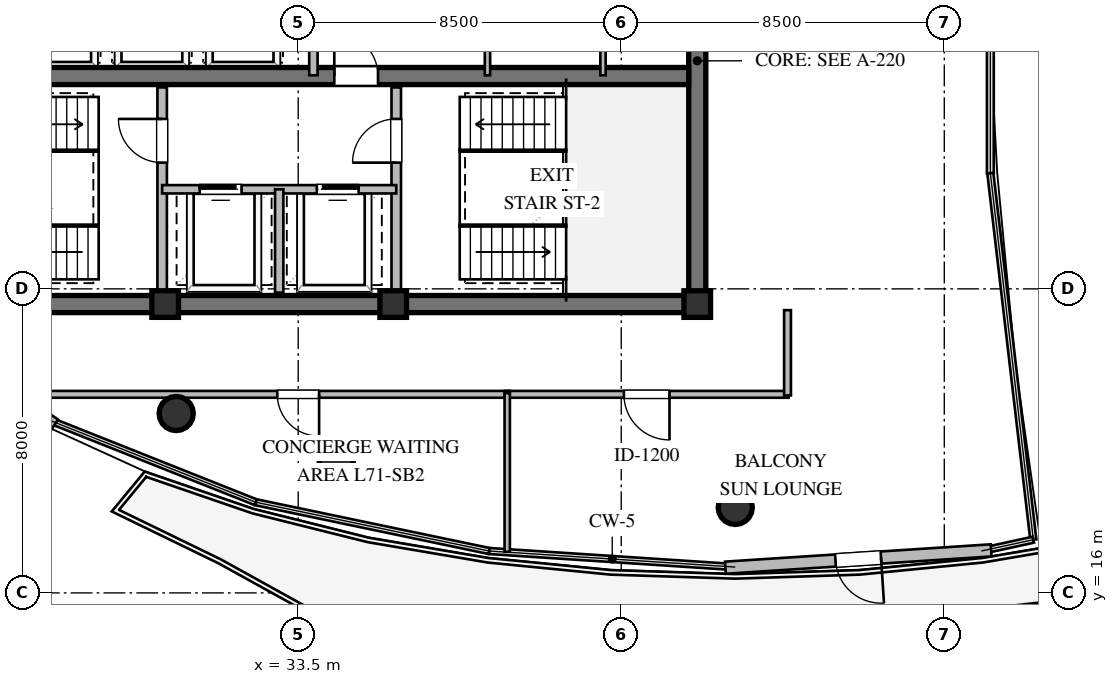
"""IFC4 building model, lengths in metres.
Left out: names, types, materials, properties, quantities, classifications, styles, units other than length and angle.
Written with IfcOpenShell. Run it as: python <this file> out.ifc"""

import sys

from ifc_helpers import new_model, si_unit, direction, frame, frame_2d, origin, origin_2d, place, context, subcontext, project, spatial, rectangle, circle, extrude, element, fill, save


model = new_model("IFC4")
c1 = context("Model", 3, precision=1e-05, world=origin(), true_north=direction((0.0, 1.0)))
c2 = subcontext(c1, "Body", "Model", "MODEL_VIEW")
j1 = project(units=[si_unit("LENGTHUNIT", "METRE"), si_unit("PLANEANGLEUNIT", "RADIAN")], contexts=[c1])
p1 = place(None, origin())
s1 = spatial("IfcSite", under=j1, at=p1, CompositionType="ELEMENT")
p2 = place(p1, origin())
s2 = spatial("IfcBuilding", under=s1, at=p2, CompositionType="ELEMENT")
p3 = place(p2, frame((0.0, 0.0, 270.0)))
s3 = spatial("IfcBuildingStorey", under=s2, at=p3, CompositionType="ELEMENT", Elevation=270.0)
p4 = place(p3, frame((21.775, 23.6, 0.0), z_axis=(0.0, 0.0, 1.0), x_axis=(1.0, 0.0, 0.0)))
e1 = element("IfcWall", 1, at=p4, inside=s3, PredefinedType="SHEAR", context=c2, shape_type="SweptSolid", body=[
    extrude(rectangle(XDim=22.45, YDim=0.45, at=frame_2d((11.225, 0.0))), origin(), (0.0, 0.0, 1.0), 3.56),
])
p5 = place(p3, frame((44.0, 23.825, 0.0), z_axis=(0.0, 0.0, 1.0), x_axis=(0.0, 1.0, 0.0)))
e2 = element("IfcWall", 2, at=p5, inside=s3, PredefinedType="SHEAR", context=c2, shape_type="SweptSolid", body=[
    extrude(rectangle(XDim=12.35, YDim=0.45, at=frame_2d((6.175, 0.0))), origin(), (0.0, 0.0, 1.0), 3.56),
])
p6 = place(p5, frame((8.675, 0.0, 0.0)))
e3 = element("IfcOpeningElement", 3, at=p6, cuts=e2, PredefinedType="OPENING", context=c2, shape_type="SweptSolid", body=[
    extrude(rectangle(XDim=1.5, YDim=2.15, at=frame_2d((0.75, 1.075))), frame((0.0, 0.235, 0.0), z_axis=(0.0, -1.0, 0.0), x_axis=(1.0, 0.0, 0.0)), (0.0, 0.0, 1.0), 0.47),
])
p7 = place(p3, frame((22.225, 29.6, 0.0), z_axis=(0.0, 0.0, 1.0), x_axis=(1.0, 0.0, 0.0)))
e4 = element("IfcWall", 4, at=p7, inside=s3, PredefinedType="SHEAR", context=c2, shape_type="SweptSolid", body=[
    extrude(rectangle(XDim=21.55, YDim=0.45, at=frame_2d((10.775, 0.0))), origin(), (0.0, 0.0, 1.0), 3.56),
])
p8 = place(p7, frame((12.225, 0.0, 0.0)))
e5 = element("IfcOpeningElement", 5, at=p8, cuts=e4, PredefinedType="OPENING", context=c2, shape_type="SweptSolid", body=[
    extrude(rectangle(XDim=1.15, YDim=2.1, at=frame_2d((0.575, 1.05))), frame((0.0, 0.235, 0.0), z_axis=(0.0, -1.0, 0.0), x_axis=(1.0, 0.0, 0.0)), (0.0, 0.0, 1.0), 0.47),
])
for number, where, z_axis, x_axis in (
    (6, (30.0, 23.6, 0.0), (0.0, 0.0, 1.0), (1.0, 0.0, 0.0)),
    (7, (36.0, 23.6, 0.0), (0.0, 0.0, 1.0), (1.0, 0.0, 0.0)),
    (8, (44.0, 23.6, 0.0), (0.0, 0.0, 1.0), (1.0, 0.0, 0.0)),
):
    element("IfcColumn", number, at=place(p3, frame(where, z_axis=z_axis, x_axis=x_axis)), inside=s3, PredefinedType="COLUMN", context=c2, shape_type="SweptSolid", body=[
        extrude(rectangle(XDim=0.7, YDim=0.7, at=origin_2d()), origin(), (0.0, 0.0, 1.0), 3.8),
    ])
for number, where, z_axis, x_axis in (
    (9, (30.29, 20.72, 0.0), (0.0, 0.0, 1.0), (1.0, 0.0, 0.0)),
    (10, (34.5, 19.42, 0.0), (0.0, 0.0, 1.0), (1.0, 0.0, 0.0)),
    (11, (45.0, 18.25, 0.0), (0.0, 0.0, 1.0), (1.0, 0.0, 0.0)),
):
    element("IfcColumn", number, at=place(p3, frame(where, z_axis=z_axis, x_axis=x_axis)), inside=s3, PredefinedType="COLUMN", context=c2, shape_type="SweptSolid", body=[
        extrude(circle(Radius=0.45, at=origin_2d()), origin(), (0.0, 0.0, 1.0), 3.8),
    ])
p9 = place(p3, frame((51.733, 17.119, 0.0), z_axis=(0.0, 0.0, 1.0), x_axis=(-0.997881827293, -0.065052738278, 0.0)))
e12 = element("IfcWall", 12, at=p9, inside=s3, PredefinedType="STANDARD", context=c2, shape_type="SweptSolid", body=[
    extrude(rectangle(XDim=7.007, YDim=0.32, at=frame_2d((3.503, 0.0))), origin(), (0.0, 0.0, 1.0), 3.56),
])
p10 = place(p9, frame((2.904, 0.0, 0.0)))
e13 = element("IfcOpeningElement", 13, at=p10, cuts=e12, PredefinedType="OPENING", context=c2, shape_type="SweptSolid", body=[
    extrude(rectangle(XDim=1.2, YDim=2.15, at=frame_2d((0.6, 1.075))), frame((0.0, 0.17, 0.0), z_axis=(0.0, -1.0, 0.0), x_axis=(1.0, 0.0, 0.0)), (0.0, 0.0, 1.0), 0.34),
])
p11 = place(p3, frame((27.093, 20.428, 0.0), z_axis=(0.0, 0.0, 1.0), x_axis=(-0.826047009588, 0.563601222454, 0.0)))
e14 = element("IfcWall", 14, at=p11, inside=s3, PredefinedType="STANDARD", context=c2, shape_type="SweptSolid", body=[
    extrude(rectangle(XDim=6.074, YDim=0.32, at=frame_2d((3.037, 0.0))), origin(), (0.0, 0.0, 1.0), 2.35),
])
p12 = place(p3, frame((29.92, 23.9, 0.0), z_axis=(0.0, 0.0, 1.0), x_axis=(0.0, 1.0, 0.0)))
e15 = element("IfcWall", 15, at=p12, inside=s3, PredefinedType="SOLIDWALL", context=c2, shape_type="SweptSolid", body=[
    extrude(rectangle(XDim=5.4, YDim=0.25, at=frame_2d((2.7, 0.0))), origin(), (0.0, 0.0, 1.0), 3.09),
])
p13 = place(p12, frame((3.421, 0.0, 0.0)))
e16 = element("IfcOpeningElement", 16, at=p13, cuts=e15, PredefinedType="OPENING", context=c2, shape_type="SweptSolid", body=[
    extrude(rectangle(XDim=1.15, YDim=2.1, at=frame_2d((0.575, 1.05))), frame((0.0, 0.135, 0.0), z_axis=(0.0, -1.0, 0.0), x_axis=(1.0, 0.0, 0.0)), (0.0, 0.0, 1.0), 0.27),
])
p14 = place(p3, frame((36.08, 23.9, 0.0), z_axis=(0.0, 0.0, 1.0), x_axis=(0.0, 1.0, 0.0)))
e17 = element("IfcWall", 17, at=p14, inside=s3, PredefinedType="SOLIDWALL", context=c2, shape_type="SweptSolid", body=[
    extrude(rectangle(XDim=5.4, YDim=0.25, at=frame_2d((2.7, 0.0))), origin(), (0.0, 0.0, 1.0), 3.56),
])
p15 = place(p14, frame((3.421, 0.0, 0.0)))
e18 = element("IfcOpeningElement", 18, at=p15, cuts=e17, PredefinedType="OPENING", context=c2, shape_type="SweptSolid", body=[
    extrude(rectangle(XDim=1.15, YDim=2.1, at=frame_2d((0.575, 1.05))), frame((0.0, 0.135, 0.0), z_axis=(0.0, -1.0, 0.0), x_axis=(1.0, 0.0, 0.0)), (0.0, 0.0, 1.0), 0.27),
])
p16 = place(p3, frame((29.92, 26.62, 0.0), z_axis=(0.0, 0.0, 1.0), x_axis=(1.0, 0.0, 0.0)))
e19 = element("IfcWall", 19, at=p16, inside=s3, PredefinedType="SOLIDWALL", context=c2, shape_type="SweptSolid", body=[
    extrude(rectangle(XDim=6.16, YDim=0.22, at=frame_2d((3.08, 0.0))), origin(), (0.0, 0.0, 1.0), 3.56),
])
p17 = place(p16, frame((0.99, 0.0, 0.0)))
e20 = element("IfcOpeningElement", 20, at=p17, cuts=e19, PredefinedType="OPENING", context=c2, shape_type="SweptSolid", body=[
    extrude(rectangle(XDim=1.1, YDim=2.1, at=frame_2d((0.55, 1.05))), frame((0.0, 0.12, 0.0), z_axis=(0.0, -1.0, 0.0), x_axis=(1.0, 0.0, 0.0)), (0.0, 0.0, 1.0), 0.24),
])
p18 = place(p16, frame((4.07, 0.0, 0.0)))
e21 = element("IfcOpeningElement", 21, at=p18, cuts=e19, PredefinedType="OPENING", context=c2, shape_type="SweptSolid", body=[
    extrude(rectangle(XDim=1.1, YDim=2.1, at=frame_2d((0.55, 1.05))), frame((0.0, 0.12, 0.0), z_axis=(0.0, -1.0, 0.0), x_axis=(1.0, 0.0, 0.0)), (0.0, 0.0, 1.0), 0.24),
])
p19 = place(p3, frame((33.0, 23.9, 0.0), z_axis=(0.0, 0.0, 1.0), x_axis=(0.0, 1.0, 0.0)))
e22 = element("IfcWall", 22, at=p19, inside=s3, PredefinedType="SOLIDWALL", context=c2, shape_type="SweptSolid", body=[
    extrude(rectangle(XDim=2.72, YDim=0.22, at=frame_2d((1.36, 0.0))), origin(), (0.0, 0.0, 1.0), 3.56),
])
p20 = place(p3, frame((33.9, 29.62, 0.0), z_axis=(0.0, 0.0, 1.0), x_axis=(0.0, 1.0, 0.0)))
e23 = element("IfcWall", 23, at=p20, inside=s3, PredefinedType="SOLIDWALL", context=c2, shape_type="SweptSolid", body=[
    extrude(rectangle(XDim=2.36, YDim=0.22, at=frame_2d((1.18, 0.0))), origin(), (0.0, 0.0, 1.0), 3.56),
])
for number, where, z_axis, x_axis in (
    (24, (38.48, 29.62, 0.0), (0.0, 0.0, 1.0), (0.0, 1.0, 0.0)),
    (25, (41.52, 29.62, 0.0), (0.0, 0.0, 1.0), (0.0, 1.0, 0.0)),
):
    element("IfcWall", number, at=place(p3, frame(where, z_axis=z_axis, x_axis=x_axis)), inside=s3, PredefinedType="PARTITIONING", context=c2, shape_type="SweptSolid", body=[
        extrude(rectangle(XDim=2.36, YDim=0.14, at=frame_2d((1.18, 0.0))), origin(), (0.0, 0.0, 1.0), 3.56),
    ])
p21 = place(p3, frame((39.065, 21.225, 0.0), z_axis=(0.0, 0.0, 1.0), x_axis=(-1.0, 0.0, 0.0)))
e26 = element("IfcWall", 26, at=p21, inside=s3, PredefinedType="PARTITIONING", context=c2, shape_type="SweptSolid", body=[
    extrude(rectangle(XDim=13.13, YDim=0.18, at=frame_2d((6.565, 0.0))), origin(), (0.0, 0.0, 1.0), 3.017),
])
p22 = place(p21, frame((5.015, 0.0, 0.0)))
e27 = element("IfcOpeningElement", 27, at=p22, cuts=e26, PredefinedType="OPENING", context=c2, shape_type="SweptSolid", body=[
    extrude(rectangle(XDim=1.1, YDim=2.1, at=frame_2d((0.55, 1.05))), frame((0.0, 0.1, 0.0), z_axis=(0.0, -1.0, 0.0), x_axis=(1.0, 0.0, 0.0)), (0.0, 0.0, 1.0), 0.2),
])
p23 = place(p3, frame((46.405, 21.225, 0.0), z_axis=(0.0, 0.0, 1.0), x_axis=(-1.0, 0.0, 0.0)))
e28 = element("IfcWall", 28, at=p23, inside=s3, PredefinedType="PARTITIONING", context=c2, shape_type="SweptSolid", body=[
    extrude(rectangle(XDim=7.47, YDim=0.18, at=frame_2d((3.735, 0.0))), origin(), (0.0, 0.0, 1.0), 3.196),
])
p24 = place(p23, frame((3.135, 0.0, 0.0)))
e29 = element("IfcOpeningElement", 29, at=p24, cuts=e28, PredefinedType="OPENING", context=c2, shape_type="SweptSolid", body=[
    extrude(rectangle(XDim=1.2, YDim=2.15, at=frame_2d((0.6, 1.075))), frame((0.0, 0.1, 0.0), z_axis=(0.0, -1.0, 0.0), x_axis=(1.0, 0.0, 0.0)), (0.0, 0.0, 1.0), 0.2),
])
p25 = place(p3, frame((46.375, 23.44, 0.0), z_axis=(0.0, 0.0, 1.0), x_axis=(0.0, -1.0, 0.0)))
e30 = element("IfcWall", 30, at=p25, inside=s3, PredefinedType="PARTITIONING", context=c2, shape_type="SweptSolid", body=[
    extrude(rectangle(XDim=2.245, YDim=0.18, at=frame_2d((1.123, 0.0))), origin(), (0.0, 0.0, 1.0), 3.56),
])
p26 = place(p3, frame((39.0, 21.255, 0.0), z_axis=(0.0, 0.0, 1.0), x_axis=(0.0, -1.0, 0.0)))
e31 = element("IfcWall", 31, at=p26, inside=s3, PredefinedType="PARTITIONING", context=c2, shape_type="SweptSolid", body=[
    extrude(rectangle(XDim=4.174, YDim=0.14, at=frame_2d((2.087, 0.0))), origin(), (0.0, 0.0, 1.0), 3.56),
])
p27 = place(p10, origin())
e32 = element("IfcDoor", 32, at=p27, inside=s3, OperationType="SINGLE_SWING_LEFT", PredefinedType="DOOR", context=c2, shape_type="SweptSolid", body=[
    extrude(rectangle(XDim=1.2, YDim=2.15, at=frame_2d((0.6, 1.075))), frame((0.0, 0.025, 0.0), z_axis=(0.0, -1.0, 0.0), x_axis=(1.0, 0.0, 0.0)), (0.0, 0.0, 1.0), 0.05),
])
fill(e13, e32)
p28 = place(p13, origin())
e33 = element("IfcDoor", 33, at=p28, inside=s3, OperationType="SINGLE_SWING_RIGHT", PredefinedType="DOOR", context=c2, shape_type="SweptSolid", body=[
    extrude(rectangle(XDim=1.15, YDim=2.1, at=frame_2d((0.575, 1.05))), frame((0.0, 0.025, 0.0), z_axis=(0.0, -1.0, 0.0), x_axis=(1.0, 0.0, 0.0)), (0.0, 0.0, 1.0), 0.05),
])
fill(e16, e33)
p29 = place(p15, origin())
e34 = element("IfcDoor", 34, at=p29, inside=s3, OperationType="SINGLE_SWING_LEFT", PredefinedType="DOOR", context=c2, shape_type="SweptSolid", body=[
    extrude(rectangle(XDim=1.15, YDim=2.1, at=frame_2d((0.575, 1.05))), frame((0.0, 0.025, 0.0), z_axis=(0.0, -1.0, 0.0), x_axis=(1.0, 0.0, 0.0)), (0.0, 0.0, 1.0), 0.05),
])
fill(e18, e34)
p30 = place(p17, origin())
e35 = element("IfcDoor", 35, at=p30, inside=s3, OperationType="SLIDING_TO_LEFT", PredefinedType="DOOR", context=c2, shape_type="SweptSolid", body=[
    extrude(rectangle(XDim=1.1, YDim=2.1, at=frame_2d((0.55, 1.05))), frame((0.0, 0.025, 0.0), z_axis=(0.0, -1.0, 0.0), x_axis=(1.0, 0.0, 0.0)), (0.0, 0.0, 1.0), 0.05),
])
fill(e20, e35)
p31 = place(p18, origin())
e36 = element("IfcDoor", 36, at=p31, inside=s3, OperationType="SLIDING_TO_RIGHT", PredefinedType="DOOR", context=c2, shape_type="SweptSolid", body=[
    extrude(rectangle(XDim=1.1, YDim=2.1, at=frame_2d((0.55, 1.05))), frame((0.0, 0.025, 0.0), z_axis=(0.0, -1.0, 0.0), x_axis=(1.0, 0.0, 0.0)), (0.0, 0.0, 1.0), 0.05),
])
fill(e21, e36)
p32 = place(p8, origin())
e37 = element("IfcDoor", 37, at=p32, inside=s3, OperationType="SINGLE_SWING_LEFT", PredefinedType="DOOR", context=c2, shape_type="SweptSolid", body=[
    extrude(rectangle(XDim=1.15, YDim=2.1, at=frame_2d((0.575, 1.05))), frame((0.0, 0.025, 0.0), z_axis=(0.0, -1.0, 0.0), x_axis=(1.0, 0.0, 0.0)), (0.0, 0.0, 1.0), 0.05),
])
fill(e5, e37)
p33 = place(p22, origin())
e38 = element("IfcDoor", 38, at=p33, inside=s3, OperationType="SINGLE_SWING_LEFT", PredefinedType="DOOR", context=c2, shape_type="SweptSolid", body=[
    extrude(rectangle(XDim=1.1, YDim=2.1, at=frame_2d((0.55, 1.05))), frame((0.0, 0.025, 0.0), z_axis=(0.0, -1.0, 0.0), x_axis=(1.0, 0.0, 0.0)), (0.0, 0.0, 1.0), 0.05),
])
fill(e27, e38)
p34 = place(p24, origin())
e39 = element("IfcDoor", 39, at=p34, inside=s3, OperationType="SINGLE_SWING_LEFT", PredefinedType="DOOR", context=c2, shape_type="SweptSolid", body=[
    extrude(rectangle(XDim=1.2, YDim=2.15, at=frame_2d((0.6, 1.075))), frame((0.0, 0.025, 0.0), z_axis=(0.0, -1.0, 0.0), x_axis=(1.0, 0.0, 0.0)), (0.0, 0.0, 1.0), 0.05),
])
fill(e29, e39)
save(model, sys.argv[1])
